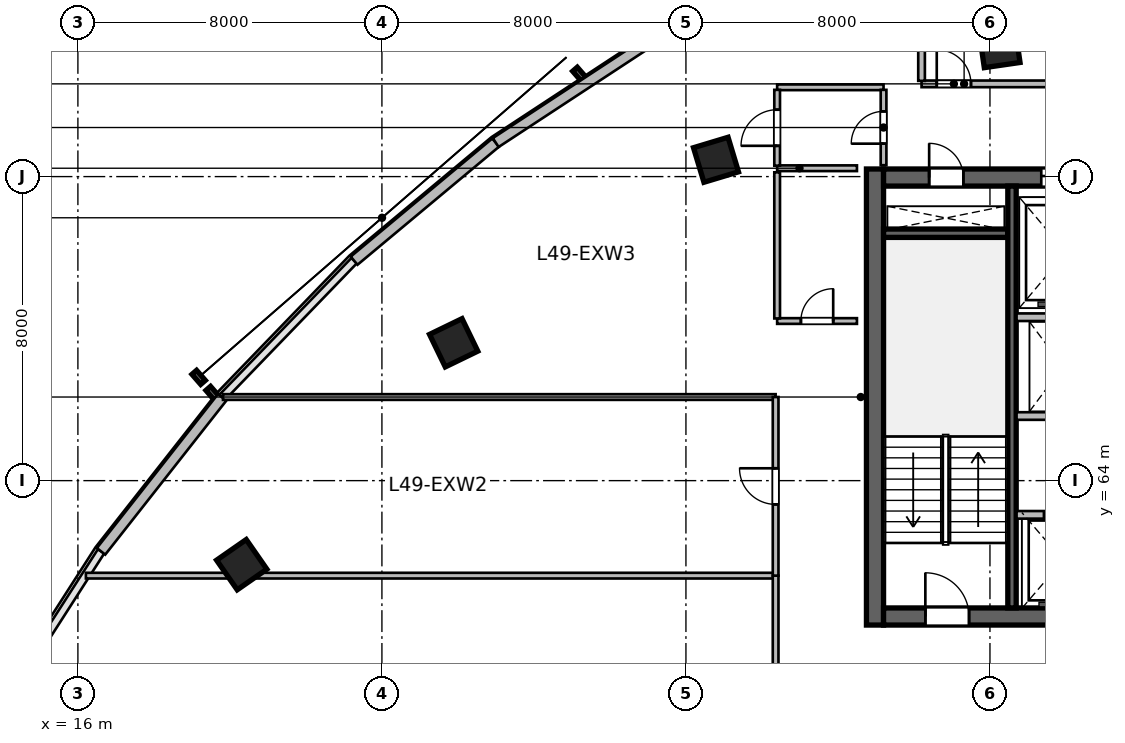
"""IFC4 building model, lengths in metres.
Left out: names, types, materials, properties, quantities, classifications, styles, units other than length and angle.
Written with IfcOpenShell. Run it as: python <this file> out.ifc"""

import sys

from ifc_helpers import new_model, si_unit, direction, frame, frame_2d, origin, origin_2d, place, context, subcontext, project, spatial, rectangle, extrude, source, transform, mapped, element, fill, save


model = new_model("IFC4")
c1 = context("Model", 3, precision=1e-05, world=origin(), true_north=direction((0.0, 1.0)))
c2 = subcontext(c1, "Body", "Model", "MODEL_VIEW")
j1 = project(units=[si_unit("LENGTHUNIT", "METRE"), si_unit("PLANEANGLEUNIT", "RADIAN")], contexts=[c1])
p1 = place(None, origin())
s1 = spatial("IfcSite", under=j1, at=p1, CompositionType="ELEMENT")
p2 = place(p1, origin())
s2 = spatial("IfcBuilding", under=s1, at=p2, CompositionType="ELEMENT")
p3 = place(p2, frame((0.0, 0.0, 204.0)))
s3 = spatial("IfcBuildingStorey", under=s2, at=p3, CompositionType="ELEMENT", Elevation=204.0)
m1 = source(origin(), c2, "Body", "SweptSolid", [
    extrude(rectangle(XDim=12.0, YDim=0.45, at=frame_2d((6.0, 0.0))), origin(), (0.0, 0.0, 1.0), 3.9),
])
p4 = place(p3, frame((36.975, 60.2, 0.0), z_axis=(0.0, 0.0, 1.0), x_axis=(0.0, 1.0, 0.0)))
e1 = element("IfcWall", 1, at=p4, inside=s3, PredefinedType="SHEAR", context=c2, shape_type="MappedRepresentation", body=[
    mapped(m1, transform((0.0, 0.0, 0.0), scale=1.0)),
])
m2 = source(origin(), c2, "Body", "SweptSolid", [
    extrude(rectangle(XDim=21.6, YDim=0.45, at=frame_2d((10.8, 0.0))), origin(), (0.0, 0.0, 1.0), 3.9),
])
p5 = place(p3, frame((37.2, 60.425, 0.0), z_axis=(0.0, 0.0, 1.0), x_axis=(1.0, 0.0, 0.0)))
e2 = element("IfcWall", 2, at=p5, inside=s3, PredefinedType="SHEAR", context=c2, shape_type="MappedRepresentation", body=[
    mapped(m2, transform((0.0, 0.0, 0.0), scale=1.0)),
])
p6 = place(p5, frame((1.1, 0.0, 0.0)))
e3 = element("IfcOpeningElement", 3, at=p6, cuts=e2, PredefinedType="OPENING", context=c2, shape_type="SweptSolid", body=[
    extrude(rectangle(XDim=1.15, YDim=2.15, at=frame_2d((0.575, 1.075))), frame((0.0, 0.235, 0.0), z_axis=(0.0, -1.0, 0.0), x_axis=(1.0, 0.0, 0.0)), (0.0, 0.0, 1.0), 0.47),
])
p7 = place(p5, frame((19.5, 0.0, 0.0)))
e4 = element("IfcOpeningElement", 4, at=p7, cuts=e2, PredefinedType="OPENING", context=c2, shape_type="SweptSolid", body=[
    extrude(rectangle(XDim=0.9, YDim=2.1, at=frame_2d((0.45, 1.05))), frame((0.0, 0.235, 0.0), z_axis=(0.0, -1.0, 0.0), x_axis=(1.0, 0.0, 0.0)), (0.0, 0.0, 1.0), 0.47),
])
p8 = place(p5, frame((12.02, 0.0, 0.0)))
e5 = element("IfcOpeningElement", 5, at=p8, cuts=e2, PredefinedType="OPENING", context=c2, shape_type="SweptSolid", body=[
    extrude(rectangle(XDim=1.6, YDim=2.15, at=frame_2d((0.8, 1.075))), frame((0.0, 0.235, 0.0), z_axis=(0.0, -1.0, 0.0), x_axis=(1.0, 0.0, 0.0)), (0.0, 0.0, 1.0), 0.47),
])
p9 = place(p3, frame((37.2, 71.975, 0.0), z_axis=(0.0, 0.0, 1.0), x_axis=(1.0, 0.0, 0.0)))
e6 = element("IfcWall", 6, at=p9, inside=s3, PredefinedType="SHEAR", context=c2, shape_type="MappedRepresentation", body=[
    mapped(m2, transform((0.0, 0.0, 0.0), scale=1.0)),
])
p10 = place(p9, frame((1.2, 0.0, 0.0)))
e7 = element("IfcOpeningElement", 7, at=p10, cuts=e6, PredefinedType="OPENING", context=c2, shape_type="SweptSolid", body=[
    extrude(rectangle(XDim=0.9, YDim=2.1, at=frame_2d((0.45, 1.05))), frame((0.0, 0.235, 0.0), z_axis=(0.0, -1.0, 0.0), x_axis=(1.0, 0.0, 0.0)), (0.0, 0.0, 1.0), 0.47),
])
p11 = place(p9, frame((14.7, 0.0, 0.0)))
e8 = element("IfcOpeningElement", 8, at=p11, cuts=e6, PredefinedType="OPENING", context=c2, shape_type="SweptSolid", body=[
    extrude(rectangle(XDim=1.2, YDim=2.15, at=frame_2d((0.6, 1.075))), frame((0.0, 0.235, 0.0), z_axis=(0.0, -1.0, 0.0), x_axis=(1.0, 0.0, 0.0)), (0.0, 0.0, 1.0), 0.47),
])
p12 = place(p9, frame((4.15, 0.0, 0.0)))
e9 = element("IfcOpeningElement", 9, at=p12, cuts=e6, PredefinedType="OPENING", context=c2, shape_type="SweptSolid", body=[
    extrude(rectangle(XDim=1.3, YDim=2.15, at=frame_2d((0.65, 1.075))), frame((0.0, 0.235, 0.0), z_axis=(0.0, -1.0, 0.0), x_axis=(1.0, 0.0, 0.0)), (0.0, 0.0, 1.0), 0.47),
])
p13 = place(p9, frame((7.25, 0.0, 0.0)))
e10 = element("IfcOpeningElement", 10, at=p13, cuts=e6, PredefinedType="OPENING", context=c2, shape_type="SweptSolid", body=[
    extrude(rectangle(XDim=0.9, YDim=2.1, at=frame_2d((0.45, 1.05))), frame((0.0, 0.235, 0.0), z_axis=(0.0, -1.0, 0.0), x_axis=(1.0, 0.0, 0.0)), (0.0, 0.0, 1.0), 0.47),
])
p14 = place(p9, frame((10.95, 0.0, 0.0)))
e11 = element("IfcOpeningElement", 11, at=p14, cuts=e6, PredefinedType="OPENING", context=c2, shape_type="SweptSolid", body=[
    extrude(rectangle(XDim=0.9, YDim=2.1, at=frame_2d((0.45, 1.05))), frame((0.0, 0.235, 0.0), z_axis=(0.0, -1.0, 0.0), x_axis=(1.0, 0.0, 0.0)), (0.0, 0.0, 1.0), 0.47),
])
m3 = source(origin(), c2, "Body", "SweptSolid", [
    extrude(rectangle(XDim=3.27, YDim=0.22, at=frame_2d((1.635, 0.0))), origin(), (0.0, 0.0, 1.0), 3.9),
])
p15 = place(p3, frame((37.2, 70.51, 0.0), z_axis=(0.0, 0.0, 1.0), x_axis=(1.0, 0.0, 0.0)))
e12 = element("IfcWall", 12, at=p15, inside=s3, PredefinedType="SHEAR", context=c2, shape_type="MappedRepresentation", body=[
    mapped(m3, transform((0.0, 0.0, 0.0), scale=1.0)),
])
m4 = source(origin(), c2, "Body", "SweptSolid", [
    extrude(rectangle(XDim=11.1, YDim=0.22, at=frame_2d((5.55, 0.0))), origin(), (0.0, 0.0, 1.0), 3.9),
])
p16 = place(p3, frame((40.58, 60.65, 0.0), z_axis=(0.0, 0.0, 1.0), x_axis=(0.0, 1.0, 0.0)))
e13 = element("IfcWall", 13, at=p16, inside=s3, PredefinedType="SHEAR", context=c2, shape_type="MappedRepresentation", body=[
    mapped(m4, transform((0.0, 0.0, 0.0), scale=1.0)),
])
m5 = source(origin(), c2, "Body", "SweptSolid", [
    extrude(rectangle(XDim=0.95, YDim=0.95, at=origin_2d()), origin(), (0.0, 0.0, 1.0), 3.9),
])
for number, where, z_axis, x_axis in (
    (14, (20.311, 61.789, 0.0), (0.0, 0.0, 1.0), (-0.571, 0.821, 0.0)),
    (15, (25.888, 67.627, 0.0), (0.0, 0.0, 1.0), (-0.436, 0.9, 0.0)),
    (16, (32.791, 72.442, 0.0), (0.0, 0.0, 1.0), (-0.289, 0.957, 0.0)),
    (17, (40.253, 75.404, 0.0), (0.0, 0.0, 1.0), (-0.143, 0.99, 0.0)),
):
    element("IfcColumn", number, at=place(p3, frame(where, z_axis=z_axis, x_axis=x_axis)), inside=s3, PredefinedType="COLUMN", context=c2, shape_type="MappedRepresentation", body=[
        mapped(m5, transform((0.0, 0.0, 0.0), scale=1.0)),
    ])
m6 = source(origin(), c2, "Body", "SweptSolid", [
    extrude(rectangle(XDim=5.153, YDim=0.28, at=frame_2d((2.577, 0.0))), origin(), (0.0, 0.0, 1.0), 3.64),
])
p17 = place(p3, frame((16.609, 62.14, 0.0), z_axis=(0.0, 0.0, 1.0), x_axis=(0.618179283891, 0.786037132054, 0.0)))
e18 = element("IfcWall", 18, at=p17, inside=s3, PredefinedType="SOLIDWALL", context=c2, shape_type="MappedRepresentation", body=[
    mapped(m6, transform((0.0, 0.0, 0.0), scale=1.0)),
])
m7 = source(origin(), c2, "Body", "SweptSolid", [
    extrude(rectangle(XDim=4.852, YDim=0.28, at=frame_2d((2.426, 0.0))), origin(), (0.0, 0.0, 1.0), 3.64),
])
p18 = place(p3, frame((23.268, 69.788, 0.0), z_axis=(0.0, 0.0, 1.0), x_axis=(0.767936605821, 0.640525853843, 0.0)))
e19 = element("IfcWall", 19, at=p18, inside=s3, PredefinedType="SOLIDWALL", context=c2, shape_type="MappedRepresentation", body=[
    mapped(m7, transform((0.0, 0.0, 0.0), scale=1.0)),
])
m8 = source(origin(), c2, "Body", "SweptSolid", [
    extrude(rectangle(XDim=4.713, YDim=0.28, at=frame_2d((2.356, 0.0))), origin(), (0.0, 0.0, 1.0), 3.64),
])
p19 = place(p3, frame((26.994, 72.896, 0.0), z_axis=(0.0, 0.0, 1.0), x_axis=(0.835974386457, 0.548768462275, 0.0)))
e20 = element("IfcWall", 20, at=p19, inside=s3, PredefinedType="SOLIDWALL", context=c2, shape_type="MappedRepresentation", body=[
    mapped(m8, transform((0.0, 0.0, 0.0), scale=1.0)),
])
m9 = source(origin(), c2, "Body", "SweptSolid", [
    extrude(rectangle(XDim=8.8, YDim=0.2, at=frame_2d((4.4, 0.0))), origin(), (0.0, 0.0, 1.0), 3.64),
])
p20 = place(p3, frame((40.7, 68.3, 0.0), z_axis=(0.0, 0.0, 1.0), x_axis=(1.0, 0.0, 0.0)))
e21 = element("IfcWall", 21, at=p20, inside=s3, PredefinedType="SOLIDWALL", context=c2, shape_type="MappedRepresentation", body=[
    mapped(m9, transform((0.0, 0.0, 0.0), scale=1.0)),
])
m10 = source(origin(), c2, "Body", "SweptSolid", [
    extrude(rectangle(XDim=8.02, YDim=0.2, at=frame_2d((4.01, 0.0))), origin(), (0.0, 0.0, 1.0), 3.64),
])
p21 = place(p3, frame((40.7, 63.1, 0.0), z_axis=(0.0, 0.0, 1.0), x_axis=(1.0, 0.0, 0.0)))
e22 = element("IfcWall", 22, at=p21, inside=s3, PredefinedType="SOLIDWALL", context=c2, shape_type="MappedRepresentation", body=[
    mapped(m10, transform((0.0, 0.0, 0.0), scale=1.0)),
])
p22 = place(p21, frame((0.72, 0.0, 0.0)))
e23 = element("IfcOpeningElement", 23, at=p22, cuts=e22, PredefinedType="OPENING", context=c2, shape_type="SweptSolid", body=[
    extrude(rectangle(XDim=1.0, YDim=2.15, at=frame_2d((0.5, 1.075))), frame((0.0, 0.11, 0.0), z_axis=(0.0, -1.0, 0.0), x_axis=(1.0, 0.0, 0.0)), (0.0, 0.0, 1.0), 0.22),
])
p23 = place(p21, frame((2.62, 0.0, 0.0)))
e24 = element("IfcOpeningElement", 24, at=p23, cuts=e22, PredefinedType="OPENING", context=c2, shape_type="SweptSolid", body=[
    extrude(rectangle(XDim=1.0, YDim=2.15, at=frame_2d((0.5, 1.075))), frame((0.0, 0.11, 0.0), z_axis=(0.0, -1.0, 0.0), x_axis=(1.0, 0.0, 0.0)), (0.0, 0.0, 1.0), 0.22),
])
p24 = place(p21, frame((4.55, 0.0, 0.0)))
e25 = element("IfcOpeningElement", 25, at=p24, cuts=e22, PredefinedType="OPENING", context=c2, shape_type="SweptSolid", body=[
    extrude(rectangle(XDim=1.0, YDim=2.15, at=frame_2d((0.5, 1.075))), frame((0.0, 0.11, 0.0), z_axis=(0.0, -1.0, 0.0), x_axis=(1.0, 0.0, 0.0)), (0.0, 0.0, 1.0), 0.22),
])
p25 = place(p21, frame((6.55, 0.0, 0.0)))
e26 = element("IfcOpeningElement", 26, at=p25, cuts=e22, PredefinedType="OPENING", context=c2, shape_type="SweptSolid", body=[
    extrude(rectangle(XDim=1.0, YDim=2.15, at=frame_2d((0.5, 1.075))), frame((0.0, 0.11, 0.0), z_axis=(0.0, -1.0, 0.0), x_axis=(1.0, 0.0, 0.0)), (0.0, 0.0, 1.0), 0.22),
])
p26 = place(p3, frame((40.7, 65.7, 0.0), z_axis=(0.0, 0.0, 1.0), x_axis=(1.0, 0.0, 0.0)))
e27 = element("IfcWall", 27, at=p26, inside=s3, PredefinedType="SOLIDWALL", context=c2, shape_type="MappedRepresentation", body=[
    mapped(m9, transform((0.0, 0.0, 0.0), scale=1.0)),
])
m11 = source(origin(), c2, "Body", "SweptSolid", [
    extrude(rectangle(XDim=2.1, YDim=0.15, at=frame_2d((1.05, 0.0))), origin(), (0.0, 0.0, 1.0), 3.64),
])
p27 = place(p3, frame((34.4, 72.22, 0.0), z_axis=(0.0, 0.0, 1.0), x_axis=(1.0, 0.0, 0.0)))
e28 = element("IfcWall", 28, at=p27, inside=s3, PredefinedType="PARTITIONING", context=c2, shape_type="MappedRepresentation", body=[
    mapped(m11, transform((0.0, 0.0, 0.0), scale=1.0)),
])
m12 = source(origin(), c2, "Body", "SweptSolid", [
    extrude(rectangle(XDim=2.8, YDim=0.15, at=frame_2d((1.4, 0.0))), origin(), (0.0, 0.0, 1.0), 3.64),
])
p28 = place(p3, frame((34.4, 74.35, 0.0), z_axis=(0.0, 0.0, 1.0), x_axis=(1.0, 0.0, 0.0)))
e29 = element("IfcWall", 29, at=p28, inside=s3, PredefinedType="PARTITIONING", context=c2, shape_type="MappedRepresentation", body=[
    mapped(m12, transform((0.0, 0.0, 0.0), scale=1.0)),
])
m13 = source(origin(), c2, "Body", "SweptSolid", [
    extrude(rectangle(XDim=1.995, YDim=0.15, at=frame_2d((0.998, 0.0))), origin(), (0.0, 0.0, 1.0), 3.64),
])
p29 = place(p3, frame((34.4, 72.288, 0.0), z_axis=(0.0, 0.0, 1.0), x_axis=(0.0, 1.0, 0.0)))
e30 = element("IfcWall", 30, at=p29, inside=s3, PredefinedType="PARTITIONING", context=c2, shape_type="MappedRepresentation", body=[
    mapped(m13, transform((0.0, 0.0, 0.0), scale=1.0)),
])
p30 = place(p29, frame((0.522, 0.0, 0.0)))
e31 = element("IfcOpeningElement", 31, at=p30, cuts=e30, PredefinedType="OPENING", context=c2, shape_type="SweptSolid", body=[
    extrude(rectangle(XDim=0.95, YDim=2.1, at=frame_2d((0.475, 1.05))), frame((0.0, 0.085, 0.0), z_axis=(0.0, -1.0, 0.0), x_axis=(1.0, 0.0, 0.0)), (0.0, 0.0, 1.0), 0.17),
])
m14 = source(origin(), c2, "Body", "SweptSolid", [
    extrude(rectangle(XDim=1.982, YDim=0.15, at=frame_2d((0.991, 0.0))), origin(), (0.0, 0.0, 1.0), 3.64),
])
p31 = place(p3, frame((37.2, 72.3, 0.0), z_axis=(0.0, 0.0, 1.0), x_axis=(0.0, 1.0, 0.0)))
e32 = element("IfcWall", 32, at=p31, inside=s3, PredefinedType="PARTITIONING", context=c2, shape_type="MappedRepresentation", body=[
    mapped(m14, transform((0.0, 0.0, 0.0), scale=1.0)),
])
p32 = place(p31, frame((0.566, 0.0, 0.0)))
e33 = element("IfcOpeningElement", 33, at=p32, cuts=e32, PredefinedType="OPENING", context=c2, shape_type="SweptSolid", body=[
    extrude(rectangle(XDim=0.85, YDim=2.1, at=frame_2d((0.425, 1.05))), frame((0.0, 0.085, 0.0), z_axis=(0.0, -1.0, 0.0), x_axis=(1.0, 0.0, 0.0)), (0.0, 0.0, 1.0), 0.17),
])
p33 = place(p3, frame((34.4, 68.2, 0.0), z_axis=(0.0, 0.0, 1.0), x_axis=(1.0, 0.0, 0.0)))
e34 = element("IfcWall", 34, at=p33, inside=s3, PredefinedType="PARTITIONING", context=c2, shape_type="MappedRepresentation", body=[
    mapped(m11, transform((0.0, 0.0, 0.0), scale=1.0)),
])
p34 = place(p33, frame((0.625, 0.0, 0.0)))
e35 = element("IfcOpeningElement", 35, at=p34, cuts=e34, PredefinedType="OPENING", context=c2, shape_type="SweptSolid", body=[
    extrude(rectangle(XDim=0.85, YDim=2.1, at=frame_2d((0.425, 1.05))), frame((0.0, 0.085, 0.0), z_axis=(0.0, -1.0, 0.0), x_axis=(1.0, 0.0, 0.0)), (0.0, 0.0, 1.0), 0.17),
])
m15 = source(origin(), c2, "Body", "SweptSolid", [
    extrude(rectangle(XDim=3.845, YDim=0.15, at=frame_2d((1.922, 0.0))), origin(), (0.0, 0.0, 1.0), 3.64),
])
p35 = place(p3, frame((34.4, 68.268, 0.0), z_axis=(0.0, 0.0, 1.0), x_axis=(0.0, 1.0, 0.0)))
e36 = element("IfcWall", 36, at=p35, inside=s3, PredefinedType="PARTITIONING", context=c2, shape_type="MappedRepresentation", body=[
    mapped(m15, transform((0.0, 0.0, 0.0), scale=1.0)),
])
m16 = source(origin(), c2, "Body", "SweptSolid", [
    extrude(rectangle(XDim=4.0, YDim=0.175, at=frame_2d((2.0, 0.0))), origin(), (0.0, 0.0, 1.0), 3.64),
])
p36 = place(p3, frame((38.2, 74.44, 0.0), z_axis=(0.0, 0.0, 1.0), x_axis=(1.0, 0.0, 0.0)))
e37 = element("IfcWall", 37, at=p36, inside=s3, PredefinedType="PARTITIONING", context=c2, shape_type="MappedRepresentation", body=[
    mapped(m16, transform((0.0, 0.0, 0.0), scale=1.0)),
])
p37 = place(p36, frame((0.4, 0.0, 0.0)))
e38 = element("IfcOpeningElement", 38, at=p37, cuts=e37, PredefinedType="OPENING", context=c2, shape_type="SweptSolid", body=[
    extrude(rectangle(XDim=0.9, YDim=2.08, at=frame_2d((0.45, 1.04))), frame((0.0, 0.098, 0.0), z_axis=(0.0, -1.0, 0.0), x_axis=(1.0, 0.0, 0.0)), (0.0, 0.0, 1.0), 0.195),
])
m17 = source(origin(), c2, "Body", "SweptSolid", [
    extrude(rectangle(XDim=2.403, YDim=0.175, at=frame_2d((1.201, 0.0))), origin(), (0.0, 0.0, 1.0), 3.64),
])
p38 = place(p3, frame((38.2, 74.519, 0.0), z_axis=(0.0, 0.0, 1.0), x_axis=(0.0, 1.0, 0.0)))
e39 = element("IfcWall", 39, at=p38, inside=s3, PredefinedType="PARTITIONING", context=c2, shape_type="MappedRepresentation", body=[
    mapped(m17, transform((0.0, 0.0, 0.0), scale=1.0)),
])
m18 = source(origin(), c2, "Body", "SweptSolid", [
    extrude(rectangle(XDim=18.15, YDim=0.15, at=frame_2d((9.075, 0.0))), origin(), (0.0, 0.0, 1.0), 3.64),
])
p39 = place(p3, frame((16.21, 61.5, 0.0), z_axis=(0.0, 0.0, 1.0), x_axis=(1.0, 0.0, 0.0)))
e40 = element("IfcWall", 40, at=p39, inside=s3, PredefinedType="PARTITIONING", context=c2, shape_type="MappedRepresentation", body=[
    mapped(m18, transform((0.0, 0.0, 0.0), scale=1.0)),
])
m19 = source(origin(), c2, "Body", "SweptSolid", [
    extrude(rectangle(XDim=3.54, YDim=0.15, at=frame_2d((1.77, 0.0))), origin(), (0.0, 0.0, 1.0), 3.64),
])
p40 = place(p3, frame((34.36, 57.96, 0.0), z_axis=(0.0, 0.0, 1.0), x_axis=(0.0, 1.0, 0.0)))
e41 = element("IfcWall", 41, at=p40, inside=s3, PredefinedType="PARTITIONING", context=c2, shape_type="MappedRepresentation", body=[
    mapped(m19, transform((0.0, 0.0, 0.0), scale=1.0)),
])
m20 = source(origin(), c2, "Body", "SweptSolid", [
    extrude(rectangle(XDim=14.542, YDim=0.15, at=frame_2d((7.271, 0.0))), origin(), (0.0, 0.0, 1.0), 3.64),
])
p41 = place(p3, frame((19.818, 66.2, 0.0), z_axis=(0.0, 0.0, 1.0), x_axis=(1.0, 0.0, 0.0)))
e42 = element("IfcWall", 42, at=p41, inside=s3, PredefinedType="PARTITIONING", context=c2, shape_type="MappedRepresentation", body=[
    mapped(m20, transform((0.0, 0.0, 0.0), scale=1.0)),
])
m21 = source(origin(), c2, "Body", "SweptSolid", [
    extrude(rectangle(XDim=4.7, YDim=0.15, at=frame_2d((2.35, 0.0))), origin(), (0.0, 0.0, 1.0), 3.64),
])
p42 = place(p3, frame((34.36, 61.5, 0.0), z_axis=(0.0, 0.0, 1.0), x_axis=(0.0, 1.0, 0.0)))
e43 = element("IfcWall", 43, at=p42, inside=s3, PredefinedType="PARTITIONING", context=c2, shape_type="MappedRepresentation", body=[
    mapped(m21, transform((0.0, 0.0, 0.0), scale=1.0)),
])
p43 = place(p42, frame((1.875, 0.0, 0.0)))
e44 = element("IfcOpeningElement", 44, at=p43, cuts=e43, PredefinedType="OPENING", context=c2, shape_type="SweptSolid", body=[
    extrude(rectangle(XDim=0.95, YDim=2.1, at=frame_2d((0.475, 1.05))), frame((0.0, 0.085, 0.0), z_axis=(0.0, -1.0, 0.0), x_axis=(1.0, 0.0, 0.0)), (0.0, 0.0, 1.0), 0.17),
])
m22 = source(origin(), c2, "Body", "SweptSolid", [
    extrude(rectangle(XDim=1.15, YDim=2.15, at=frame_2d((0.575, 1.075))), frame((0.0, 0.025, 0.0), z_axis=(0.0, -1.0, 0.0), x_axis=(1.0, 0.0, 0.0)), (0.0, 0.0, 1.0), 0.05),
])
p44 = place(p6, origin())
e45 = element("IfcDoor", 45, at=p44, inside=s3, OperationType="SINGLE_SWING_LEFT", PredefinedType="DOOR", context=c2, shape_type="MappedRepresentation", body=[
    mapped(m22, transform((0.0, 0.0, 0.0), scale=1.0)),
])
fill(e3, e45)
m23 = source(origin(), c2, "Body", "SweptSolid", [
    extrude(rectangle(XDim=0.9, YDim=2.1, at=frame_2d((0.45, 1.05))), frame((0.0, 0.025, 0.0), z_axis=(0.0, -1.0, 0.0), x_axis=(1.0, 0.0, 0.0)), (0.0, 0.0, 1.0), 0.05),
])
p45 = place(p10, origin())
e46 = element("IfcDoor", 46, at=p45, inside=s3, OperationType="SINGLE_SWING_LEFT", PredefinedType="DOOR", context=c2, shape_type="MappedRepresentation", body=[
    mapped(m23, transform((0.0, 0.0, 0.0), scale=1.0)),
])
fill(e7, e46)
m24 = source(origin(), c2, "Body", "SweptSolid", [
    extrude(rectangle(XDim=1.3, YDim=2.15, at=frame_2d((0.65, 1.075))), frame((0.0, 0.025, 0.0), z_axis=(0.0, -1.0, 0.0), x_axis=(1.0, 0.0, 0.0)), (0.0, 0.0, 1.0), 0.05),
])
p46 = place(p12, origin())
e47 = element("IfcDoor", 47, at=p46, inside=s3, OperationType="DOUBLE_DOOR_SLIDING", PredefinedType="DOOR", context=c2, shape_type="MappedRepresentation", body=[
    mapped(m24, transform((0.0, 0.0, 0.0), scale=1.0)),
])
fill(e9, e47)
m25 = source(origin(), c2, "Body", "SweptSolid", [
    extrude(rectangle(XDim=1.0, YDim=2.15, at=frame_2d((0.5, 1.075))), frame((0.0, 0.025, 0.0), z_axis=(0.0, -1.0, 0.0), x_axis=(1.0, 0.0, 0.0)), (0.0, 0.0, 1.0), 0.05),
])
p47 = place(p22, origin())
e48 = element("IfcDoor", 48, at=p47, inside=s3, OperationType="DOUBLE_DOOR_SLIDING", PredefinedType="DOOR", context=c2, shape_type="MappedRepresentation", body=[
    mapped(m25, transform((0.0, 0.0, 0.0), scale=1.0)),
])
fill(e23, e48)
m26 = source(origin(), c2, "Body", "SweptSolid", [
    extrude(rectangle(XDim=0.85, YDim=2.1, at=frame_2d((0.425, 1.05))), frame((0.0, 0.025, 0.0), z_axis=(0.0, -1.0, 0.0), x_axis=(1.0, 0.0, 0.0)), (0.0, 0.0, 1.0), 0.05),
])
p48 = place(p32, origin())
e49 = element("IfcDoor", 49, at=p48, inside=s3, OperationType="SINGLE_SWING_LEFT", PredefinedType="DOOR", context=c2, shape_type="MappedRepresentation", body=[
    mapped(m26, transform((0.0, 0.0, 0.0), scale=1.0)),
])
fill(e33, e49)
p49 = place(p34, origin())
e50 = element("IfcDoor", 50, at=p49, inside=s3, OperationType="SINGLE_SWING_RIGHT", PredefinedType="DOOR", context=c2, shape_type="MappedRepresentation", body=[
    mapped(m26, transform((0.0, 0.0, 0.0), scale=1.0)),
])
fill(e35, e50)
m27 = source(origin(), c2, "Body", "SweptSolid", [
    extrude(rectangle(XDim=0.9, YDim=2.08, at=frame_2d((0.45, 1.04))), frame((0.0, 0.025, 0.0), z_axis=(0.0, -1.0, 0.0), x_axis=(1.0, 0.0, 0.0)), (0.0, 0.0, 1.0), 0.05),
])
p50 = place(p37, origin())
e51 = element("IfcDoor", 51, at=p50, inside=s3, OperationType="SINGLE_SWING_LEFT", PredefinedType="DOOR", context=c2, shape_type="MappedRepresentation", body=[
    mapped(m27, transform((0.0, 0.0, 0.0), scale=1.0)),
])
fill(e38, e51)
m28 = source(origin(), c2, "Body", "SweptSolid", [
    extrude(rectangle(XDim=0.95, YDim=2.1, at=frame_2d((0.475, 1.05))), frame((0.0, 0.025, 0.0), z_axis=(0.0, -1.0, 0.0), x_axis=(1.0, 0.0, 0.0)), (0.0, 0.0, 1.0), 0.05),
])
p51 = place(p43, origin())
e52 = element("IfcDoor", 52, at=p51, inside=s3, OperationType="SINGLE_SWING_RIGHT", PredefinedType="DOOR", context=c2, shape_type="MappedRepresentation", body=[
    mapped(m28, transform((0.0, 0.0, 0.0), scale=1.0)),
])
fill(e44, e52)
p52 = place(p30, origin())
e53 = element("IfcDoor", 53, at=p52, inside=s3, OperationType="SINGLE_SWING_LEFT", PredefinedType="DOOR", context=c2, shape_type="MappedRepresentation", body=[
    mapped(m28, transform((0.0, 0.0, 0.0), scale=1.0)),
])
fill(e31, e53)
save(model, sys.argv[1])
